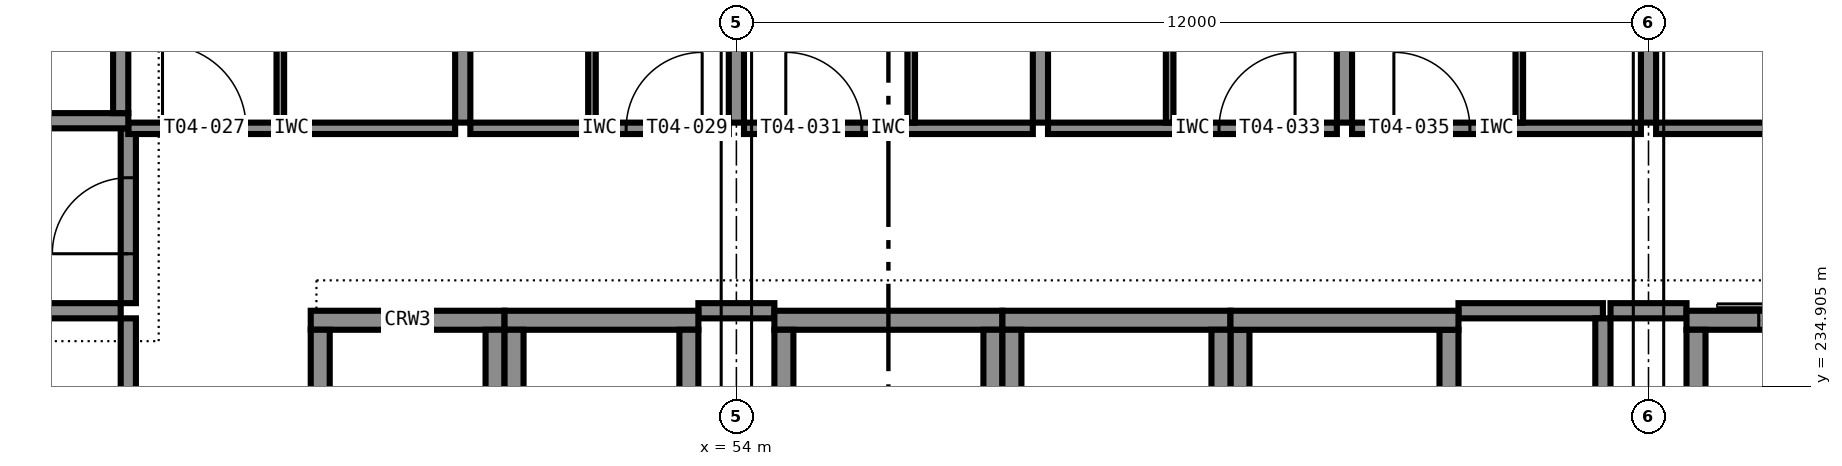
"""IFC4 building model, lengths in metres.
Left out: names, types, materials, properties, quantities, classifications, styles, units other than length and angle.
Written with IfcOpenShell. Run it as: python <this file> out.ifc"""

import sys

from ifc_helpers import new_model, si_unit, direction, frame, frame_2d, origin, place, context, subcontext, project, spatial, rectangle, extrude, element, fill, save


model = new_model("IFC4")
c1 = context("Model", 3, precision=1e-05, world=origin(), true_north=direction((0.0, 1.0)))
c2 = subcontext(c1, "Body", "Model", "MODEL_VIEW")
j1 = project(units=[si_unit("LENGTHUNIT", "METRE"), si_unit("PLANEANGLEUNIT", "RADIAN")], contexts=[c1])
p1 = place(None, origin())
s1 = spatial("IfcSite", under=j1, at=p1, CompositionType="ELEMENT")
p2 = place(p1, origin())
s2 = spatial("IfcBuilding", under=s1, at=p2, CompositionType="ELEMENT")
p3 = place(p2, frame((0.0, 0.0, 24.6)))
s3 = spatial("IfcBuildingStorey", under=s2, at=p3, CompositionType="ELEMENT", Elevation=24.6)
p4 = place(p3, frame((54.5, 235.775, 0.0), z_axis=(0.0, 0.0, 1.0), x_axis=(1.0, 0.0, 0.0)))
e1 = element("IfcWall", 1, at=p4, inside=s3, PredefinedType="SHEAR", context=c2, shape_type="SweptSolid", body=[
    extrude(rectangle(XDim=3.0, YDim=0.25, at=frame_2d((1.5, 0.0))), origin(), (0.0, 0.0, 1.0), 3.6),
])
for number, where, z_axis, x_axis in (
    (2, (54.625, 232.35, 0.0), (0.0, 0.0, 1.0), (0.0, 1.0, 0.0)),
    (3, (57.375, 232.35, 0.0), (0.0, 0.0, 1.0), (0.0, 1.0, 0.0)),
):
    element("IfcWall", number, at=place(p3, frame(where, z_axis=z_axis, x_axis=x_axis)), inside=s3, PredefinedType="SHEAR", context=c2, shape_type="SweptSolid", body=[
        extrude(rectangle(XDim=3.3, YDim=0.25, at=frame_2d((1.65, 0.0))), origin(), (0.0, 0.0, 1.0), 3.6),
    ])
p5 = place(p3, frame((57.5, 235.775, 0.0), z_axis=(0.0, 0.0, 1.0), x_axis=(1.0, 0.0, 0.0)))
e4 = element("IfcWall", 4, at=p5, inside=s3, PredefinedType="SHEAR", context=c2, shape_type="SweptSolid", body=[
    extrude(rectangle(XDim=3.0, YDim=0.25, at=frame_2d((1.5, 0.0))), origin(), (0.0, 0.0, 1.0), 3.6),
])
for number, where, z_axis, x_axis in (
    (5, (57.625, 232.35, 0.0), (0.0, 0.0, 1.0), (0.0, 1.0, 0.0)),
    (6, (60.375, 232.35, 0.0), (0.0, 0.0, 1.0), (0.0, 1.0, 0.0)),
):
    element("IfcWall", number, at=place(p3, frame(where, z_axis=z_axis, x_axis=x_axis)), inside=s3, PredefinedType="SHEAR", context=c2, shape_type="SweptSolid", body=[
        extrude(rectangle(XDim=3.3, YDim=0.25, at=frame_2d((1.65, 0.0))), origin(), (0.0, 0.0, 1.0), 3.6),
    ])
p6 = place(p3, frame((60.5, 235.775, 0.0), z_axis=(0.0, 0.0, 1.0), x_axis=(1.0, 0.0, 0.0)))
e7 = element("IfcWall", 7, at=p6, inside=s3, PredefinedType="SHEAR", context=c2, shape_type="SweptSolid", body=[
    extrude(rectangle(XDim=3.0, YDim=0.25, at=frame_2d((1.5, 0.0))), origin(), (0.0, 0.0, 1.0), 3.6),
])
for number, where, z_axis, x_axis in (
    (8, (60.625, 232.35, 0.0), (0.0, 0.0, 1.0), (0.0, 1.0, 0.0)),
    (9, (63.375, 232.35, 0.0), (0.0, 0.0, 1.0), (0.0, 1.0, 0.0)),
):
    element("IfcWall", number, at=place(p3, frame(where, z_axis=z_axis, x_axis=x_axis)), inside=s3, PredefinedType="SHEAR", context=c2, shape_type="SweptSolid", body=[
        extrude(rectangle(XDim=3.3, YDim=0.25, at=frame_2d((1.65, 0.0))), origin(), (0.0, 0.0, 1.0), 3.6),
    ])
p7 = place(p3, frame((66.5, 235.775, 0.0), z_axis=(0.0, 0.0, 1.0), x_axis=(1.0, 0.0, 0.0)))
e10 = element("IfcWall", 10, at=p7, inside=s3, PredefinedType="SHEAR", context=c2, shape_type="SweptSolid", body=[
    extrude(rectangle(XDim=3.0, YDim=0.25, at=frame_2d((1.5, 0.0))), origin(), (0.0, 0.0, 1.0), 3.6),
])
p8 = place(p7, frame((0.95, 0.0, 0.0)))
e11 = element("IfcOpeningElement", 11, at=p8, cuts=e10, PredefinedType="OPENING", context=c2, shape_type="SweptSolid", body=[
    extrude(rectangle(XDim=1.1, YDim=2.1, at=frame_2d((0.55, 1.05))), frame((0.0, 0.135, 0.0), z_axis=(0.0, -1.0, 0.0), x_axis=(1.0, 0.0, 0.0)), (0.0, 0.0, 1.0), 0.27),
])
p9 = place(p3, frame((66.625, 232.35, 0.0), z_axis=(0.0, 0.0, 1.0), x_axis=(0.0, 1.0, 0.0)))
e12 = element("IfcWall", 12, at=p9, inside=s3, PredefinedType="SHEAR", context=c2, shape_type="SweptSolid", body=[
    extrude(rectangle(XDim=3.3, YDim=0.25, at=frame_2d((1.65, 0.0))), origin(), (0.0, 0.0, 1.0), 3.6),
])
p10 = place(p3, frame((48.4, 235.775, 0.0), z_axis=(0.0, 0.0, 1.0), x_axis=(1.0, 0.0, 0.0)))
e13 = element("IfcWall", 13, at=p10, inside=s3, PredefinedType="SHEAR", context=c2, shape_type="SweptSolid", body=[
    extrude(rectangle(XDim=2.55, YDim=0.25, at=frame_2d((1.275, 0.0))), origin(), (0.0, 0.0, 1.0), 3.6),
])
for number, where, z_axis, x_axis in (
    (14, (48.525, 232.35, 0.0), (0.0, 0.0, 1.0), (0.0, 1.0, 0.0)),
    (15, (50.825, 232.35, 0.0), (0.0, 0.0, 1.0), (0.0, 1.0, 0.0)),
):
    element("IfcWall", number, at=place(p3, frame(where, z_axis=z_axis, x_axis=x_axis)), inside=s3, PredefinedType="SHEAR", context=c2, shape_type="SweptSolid", body=[
        extrude(rectangle(XDim=3.3, YDim=0.25, at=frame_2d((1.65, 0.0))), origin(), (0.0, 0.0, 1.0), 3.6),
    ])
p11 = place(p3, frame((50.95, 235.775, 0.0), z_axis=(0.0, 0.0, 1.0), x_axis=(1.0, 0.0, 0.0)))
e16 = element("IfcWall", 16, at=p11, inside=s3, PredefinedType="SHEAR", context=c2, shape_type="SweptSolid", body=[
    extrude(rectangle(XDim=2.55, YDim=0.25, at=frame_2d((1.275, 0.0))), origin(), (0.0, 0.0, 1.0), 3.6),
])
for number, where, z_axis, x_axis in (
    (17, (51.075, 232.35, 0.0), (0.0, 0.0, 1.0), (0.0, 1.0, 0.0)),
    (18, (53.375, 232.35, 0.0), (0.0, 0.0, 1.0), (0.0, 1.0, 0.0)),
):
    element("IfcWall", number, at=place(p3, frame(where, z_axis=z_axis, x_axis=x_axis)), inside=s3, PredefinedType="SHEAR", context=c2, shape_type="SweptSolid", body=[
        extrude(rectangle(XDim=3.3, YDim=0.25, at=frame_2d((1.65, 0.0))), origin(), (0.0, 0.0, 1.0), 3.6),
    ])
p12 = place(p3, frame((42.5, 238.4, 0.0), z_axis=(0.0, 0.0, 1.0), x_axis=(1.0, 0.0, 0.0)))
e19 = element("IfcWall", 19, at=p12, inside=s3, PredefinedType="SHEAR", context=c2, shape_type="SweptSolid", body=[
    extrude(rectangle(XDim=3.5, YDim=0.2, at=frame_2d((1.75, 0.0))), origin(), (0.0, 0.0, 1.0), 3.6),
])
p13 = place(p12, frame((1.15, 0.0, 0.0)))
e20 = element("IfcOpeningElement", 20, at=p13, cuts=e19, PredefinedType="OPENING", context=c2, shape_type="SweptSolid", body=[
    extrude(rectangle(XDim=1.2, YDim=2.1, at=frame_2d((0.6, 1.05))), frame((0.0, 0.11, 0.0), z_axis=(0.0, -1.0, 0.0), x_axis=(1.0, 0.0, 0.0)), (0.0, 0.0, 1.0), 0.22),
])
p14 = place(p3, frame((45.9, 238.5, 0.0), z_axis=(0.0, 0.0, 1.0), x_axis=(0.0, 1.0, 0.0)))
e21 = element("IfcWall", 21, at=p14, inside=s3, PredefinedType="SHEAR", context=c2, shape_type="SweptSolid", body=[
    extrude(rectangle(XDim=7.0, YDim=0.2, at=frame_2d((3.5, 0.0))), origin(), (0.0, 0.0, 1.0), 3.6),
])
p15 = place(p3, frame((42.3, 235.9, 0.0), z_axis=(0.0, 0.0, 1.0), x_axis=(1.0, 0.0, 0.0)))
e22 = element("IfcWall", 22, at=p15, inside=s3, PredefinedType="PARTITIONING", context=c2, shape_type="SweptSolid", body=[
    extrude(rectangle(XDim=3.6, YDim=0.2, at=frame_2d((1.8, 0.0))), origin(), (0.0, 0.0, 1.0), 3.4),
])
p16 = place(p3, frame((53.5, 235.9, 0.0), z_axis=(0.0, 0.0, 1.0), x_axis=(1.0, 0.0, 0.0)))
e23 = element("IfcWall", 23, at=p16, inside=s3, PredefinedType="PARTITIONING", context=c2, shape_type="SweptSolid", body=[
    extrude(rectangle(XDim=1.0, YDim=0.2, at=frame_2d((0.5, 0.0))), origin(), (0.0, 0.0, 1.0), 3.4),
])
p17 = place(p3, frame((63.5, 235.9, 0.0), z_axis=(0.0, 0.0, 1.0), x_axis=(1.0, 0.0, 0.0)))
e24 = element("IfcWall", 24, at=p17, inside=s3, PredefinedType="PARTITIONING", context=c2, shape_type="SweptSolid", body=[
    extrude(rectangle(XDim=1.9, YDim=0.2, at=frame_2d((0.95, 0.0))), origin(), (0.0, 0.0, 1.0), 3.4),
])
p18 = place(p3, frame((65.5, 235.9, 0.0), z_axis=(0.0, 0.0, 1.0), x_axis=(1.0, 0.0, 0.0)))
e25 = element("IfcWall", 25, at=p18, inside=s3, PredefinedType="PARTITIONING", context=c2, shape_type="SweptSolid", body=[
    extrude(rectangle(XDim=1.0, YDim=0.2, at=frame_2d((0.5, 0.0))), origin(), (0.0, 0.0, 1.0), 3.4),
])
p19 = place(p3, frame((46.0, 232.2, 0.0), z_axis=(0.0, 0.0, 1.0), x_axis=(0.0, 1.0, 0.0)))
e26 = element("IfcWall", 26, at=p19, inside=s3, PredefinedType="PARTITIONING", context=c2, shape_type="SweptSolid", body=[
    extrude(rectangle(XDim=3.6, YDim=0.2, at=frame_2d((1.8, 0.0))), origin(), (0.0, 0.0, 1.0), 3.4),
])
p20 = place(p19, frame((1.35, 0.0, 0.0)))
e27 = element("IfcOpeningElement", 27, at=p20, cuts=e26, PredefinedType="OPENING", context=c2, shape_type="SweptSolid", body=[
    extrude(rectangle(XDim=0.9, YDim=2.1, at=frame_2d((0.45, 1.05))), frame((0.0, 0.11, 0.0), z_axis=(0.0, -1.0, 0.0), x_axis=(1.0, 0.0, 0.0)), (0.0, 0.0, 1.0), 0.22),
])
p21 = place(p3, frame((46.0, 236.0, 0.0), z_axis=(0.0, 0.0, 1.0), x_axis=(0.0, 1.0, 0.0)))
e28 = element("IfcWall", 28, at=p21, inside=s3, PredefinedType="PARTITIONING", context=c2, shape_type="SweptSolid", body=[
    extrude(rectangle(XDim=2.3, YDim=0.2, at=frame_2d((1.15, 0.0))), origin(), (0.0, 0.0, 1.0), 3.4),
])
p22 = place(p21, frame((0.65, 0.0, 0.0)))
e29 = element("IfcOpeningElement", 29, at=p22, cuts=e28, PredefinedType="OPENING", context=c2, shape_type="SweptSolid", body=[
    extrude(rectangle(XDim=1.0, YDim=2.1, at=frame_2d((0.5, 1.05))), frame((0.0, 0.11, 0.0), z_axis=(0.0, -1.0, 0.0), x_axis=(1.0, 0.0, 0.0)), (0.0, 0.0, 1.0), 0.22),
])
p23 = place(p3, frame((65.4, 232.2, 0.0), z_axis=(0.0, 0.0, 1.0), x_axis=(0.0, 1.0, 0.0)))
e30 = element("IfcWall", 30, at=p23, inside=s3, PredefinedType="PARTITIONING", context=c2, shape_type="SweptSolid", body=[
    extrude(rectangle(XDim=3.6, YDim=0.2, at=frame_2d((1.8, 0.0))), origin(), (0.0, 0.0, 1.0), 3.4),
])
p24 = place(p3, frame((46.0, 238.3, 0.0), z_axis=(0.0, 0.0, 1.0), x_axis=(1.0, 0.0, 0.0)))
e31 = element("IfcWall", 31, at=p24, inside=s3, PredefinedType="PARTITIONING", context=c2, shape_type="SweptSolid", body=[
    extrude(rectangle(XDim=4.3, YDim=0.15, at=frame_2d((2.15, 0.0))), origin(), (0.0, 0.0, 1.0), 3.4),
])
p25 = place(p24, frame((0.45, 0.0, 0.0)))
e32 = element("IfcOpeningElement", 32, at=p25, cuts=e31, PredefinedType="OPENING", context=c2, shape_type="SweptSolid", body=[
    extrude(rectangle(XDim=1.1, YDim=2.1, at=frame_2d((0.55, 1.05))), frame((0.0, 0.085, 0.0), z_axis=(0.0, -1.0, 0.0), x_axis=(1.0, 0.0, 0.0)), (0.0, 0.0, 1.0), 0.17),
])
p26 = place(p3, frame((48.0, 238.375, 0.0), z_axis=(0.0, 0.0, 1.0), x_axis=(0.0, 1.0, 0.0)))
e33 = element("IfcWall", 33, at=p26, inside=s3, PredefinedType="PARTITIONING", context=c2, shape_type="SweptSolid", body=[
    extrude(rectangle(XDim=2.875, YDim=0.1, at=frame_2d((1.438, 0.0))), origin(), (0.0, 0.0, 1.0), 3.4),
])
p27 = place(p26, frame((0.988, 0.0, 0.0)))
e34 = element("IfcOpeningElement", 34, at=p27, cuts=e33, PredefinedType="OPENING", context=c2, shape_type="SweptSolid", body=[
    extrude(rectangle(XDim=0.9, YDim=2.1, at=frame_2d((0.45, 1.05))), frame((0.0, 0.06, 0.0), z_axis=(0.0, -1.0, 0.0), x_axis=(1.0, 0.0, 0.0)), (0.0, 0.0, 1.0), 0.12),
])
p28 = place(p3, frame((50.5, 238.3, 0.0), z_axis=(0.0, 0.0, 1.0), x_axis=(1.0, 0.0, 0.0)))
e35 = element("IfcWall", 35, at=p28, inside=s3, PredefinedType="PARTITIONING", context=c2, shape_type="SweptSolid", body=[
    extrude(rectangle(XDim=3.4, YDim=0.15, at=frame_2d((1.7, 0.0))), origin(), (0.0, 0.0, 1.0), 3.4),
])
p29 = place(p28, frame((2.05, 0.0, 0.0)))
e36 = element("IfcOpeningElement", 36, at=p29, cuts=e35, PredefinedType="OPENING", context=c2, shape_type="SweptSolid", body=[
    extrude(rectangle(XDim=1.0, YDim=2.1, at=frame_2d((0.5, 1.05))), frame((0.0, 0.085, 0.0), z_axis=(0.0, -1.0, 0.0), x_axis=(1.0, 0.0, 0.0)), (0.0, 0.0, 1.0), 0.17),
])
p30 = place(p3, frame((52.1, 241.25, 0.0), z_axis=(0.0, 0.0, 1.0), x_axis=(0.0, -1.0, 0.0)))
e37 = element("IfcWall", 37, at=p30, inside=s3, PredefinedType="PARTITIONING", context=c2, shape_type="SweptSolid", body=[
    extrude(rectangle(XDim=2.875, YDim=0.1, at=frame_2d((1.438, 0.0))), origin(), (0.0, 0.0, 1.0), 3.4),
])
p31 = place(p30, frame((1.038, 0.0, 0.0)))
e38 = element("IfcOpeningElement", 38, at=p31, cuts=e37, PredefinedType="OPENING", context=c2, shape_type="SweptSolid", body=[
    extrude(rectangle(XDim=0.8, YDim=2.1, at=frame_2d((0.4, 1.05))), frame((0.0, 0.06, 0.0), z_axis=(0.0, -1.0, 0.0), x_axis=(1.0, 0.0, 0.0)), (0.0, 0.0, 1.0), 0.12),
])
p32 = place(p3, frame((54.1, 238.3, 0.0), z_axis=(0.0, 0.0, 1.0), x_axis=(1.0, 0.0, 0.0)))
e39 = element("IfcWall", 39, at=p32, inside=s3, PredefinedType="PARTITIONING", context=c2, shape_type="SweptSolid", body=[
    extrude(rectangle(XDim=3.8, YDim=0.15, at=frame_2d((1.9, 0.0))), origin(), (0.0, 0.0, 1.0), 3.4),
])
p33 = place(p32, frame((0.55, 0.0, 0.0)))
e40 = element("IfcOpeningElement", 40, at=p33, cuts=e39, PredefinedType="OPENING", context=c2, shape_type="SweptSolid", body=[
    extrude(rectangle(XDim=1.0, YDim=2.1, at=frame_2d((0.5, 1.05))), frame((0.0, 0.085, 0.0), z_axis=(0.0, -1.0, 0.0), x_axis=(1.0, 0.0, 0.0)), (0.0, 0.0, 1.0), 0.17),
])
p34 = place(p3, frame((56.3, 238.375, 0.0), z_axis=(0.0, 0.0, 1.0), x_axis=(0.0, 1.0, 0.0)))
e41 = element("IfcWall", 41, at=p34, inside=s3, PredefinedType="PARTITIONING", context=c2, shape_type="SweptSolid", body=[
    extrude(rectangle(XDim=2.875, YDim=0.1, at=frame_2d((1.438, 0.0))), origin(), (0.0, 0.0, 1.0), 3.4),
])
p35 = place(p34, frame((1.038, 0.0, 0.0)))
e42 = element("IfcOpeningElement", 42, at=p35, cuts=e41, PredefinedType="OPENING", context=c2, shape_type="SweptSolid", body=[
    extrude(rectangle(XDim=0.8, YDim=2.1, at=frame_2d((0.4, 1.05))), frame((0.0, 0.06, 0.0), z_axis=(0.0, -1.0, 0.0), x_axis=(1.0, 0.0, 0.0)), (0.0, 0.0, 1.0), 0.12),
])
p36 = place(p3, frame((58.1, 238.3, 0.0), z_axis=(0.0, 0.0, 1.0), x_axis=(1.0, 0.0, 0.0)))
e43 = element("IfcWall", 43, at=p36, inside=s3, PredefinedType="PARTITIONING", context=c2, shape_type="SweptSolid", body=[
    extrude(rectangle(XDim=3.8, YDim=0.15, at=frame_2d((1.9, 0.0))), origin(), (0.0, 0.0, 1.0), 3.4),
])
p37 = place(p36, frame((2.25, 0.0, 0.0)))
e44 = element("IfcOpeningElement", 44, at=p37, cuts=e43, PredefinedType="OPENING", context=c2, shape_type="SweptSolid", body=[
    extrude(rectangle(XDim=1.0, YDim=2.1, at=frame_2d((0.5, 1.05))), frame((0.0, 0.085, 0.0), z_axis=(0.0, -1.0, 0.0), x_axis=(1.0, 0.0, 0.0)), (0.0, 0.0, 1.0), 0.17),
])
p38 = place(p3, frame((59.7, 241.25, 0.0), z_axis=(0.0, 0.0, 1.0), x_axis=(0.0, -1.0, 0.0)))
e45 = element("IfcWall", 45, at=p38, inside=s3, PredefinedType="PARTITIONING", context=c2, shape_type="SweptSolid", body=[
    extrude(rectangle(XDim=2.875, YDim=0.1, at=frame_2d((1.438, 0.0))), origin(), (0.0, 0.0, 1.0), 3.4),
])
p39 = place(p38, frame((1.038, 0.0, 0.0)))
e46 = element("IfcOpeningElement", 46, at=p39, cuts=e45, PredefinedType="OPENING", context=c2, shape_type="SweptSolid", body=[
    extrude(rectangle(XDim=0.8, YDim=2.1, at=frame_2d((0.4, 1.05))), frame((0.0, 0.06, 0.0), z_axis=(0.0, -1.0, 0.0), x_axis=(1.0, 0.0, 0.0)), (0.0, 0.0, 1.0), 0.12),
])
p40 = place(p3, frame((62.1, 238.3, 0.0), z_axis=(0.0, 0.0, 1.0), x_axis=(1.0, 0.0, 0.0)))
e47 = element("IfcWall", 47, at=p40, inside=s3, PredefinedType="PARTITIONING", context=c2, shape_type="SweptSolid", body=[
    extrude(rectangle(XDim=3.8, YDim=0.15, at=frame_2d((1.9, 0.0))), origin(), (0.0, 0.0, 1.0), 3.4),
])
p41 = place(p40, frame((0.55, 0.0, 0.0)))
e48 = element("IfcOpeningElement", 48, at=p41, cuts=e47, PredefinedType="OPENING", context=c2, shape_type="SweptSolid", body=[
    extrude(rectangle(XDim=1.0, YDim=2.1, at=frame_2d((0.5, 1.05))), frame((0.0, 0.085, 0.0), z_axis=(0.0, -1.0, 0.0), x_axis=(1.0, 0.0, 0.0)), (0.0, 0.0, 1.0), 0.17),
])
p42 = place(p3, frame((64.3, 238.375, 0.0), z_axis=(0.0, 0.0, 1.0), x_axis=(0.0, 1.0, 0.0)))
e49 = element("IfcWall", 49, at=p42, inside=s3, PredefinedType="PARTITIONING", context=c2, shape_type="SweptSolid", body=[
    extrude(rectangle(XDim=2.875, YDim=0.1, at=frame_2d((1.438, 0.0))), origin(), (0.0, 0.0, 1.0), 3.4),
])
p43 = place(p42, frame((1.038, 0.0, 0.0)))
e50 = element("IfcOpeningElement", 50, at=p43, cuts=e49, PredefinedType="OPENING", context=c2, shape_type="SweptSolid", body=[
    extrude(rectangle(XDim=0.8, YDim=2.1, at=frame_2d((0.4, 1.05))), frame((0.0, 0.06, 0.0), z_axis=(0.0, -1.0, 0.0), x_axis=(1.0, 0.0, 0.0)), (0.0, 0.0, 1.0), 0.12),
])
p44 = place(p3, frame((66.1, 238.3, 0.0), z_axis=(0.0, 0.0, 1.0), x_axis=(1.0, 0.0, 0.0)))
e51 = element("IfcWall", 51, at=p44, inside=s3, PredefinedType="PARTITIONING", context=c2, shape_type="SweptSolid", body=[
    extrude(rectangle(XDim=3.8, YDim=0.15, at=frame_2d((1.9, 0.0))), origin(), (0.0, 0.0, 1.0), 3.4),
])
p45 = place(p44, frame((2.25, 0.0, 0.0)))
e52 = element("IfcOpeningElement", 52, at=p45, cuts=e51, PredefinedType="OPENING", context=c2, shape_type="SweptSolid", body=[
    extrude(rectangle(XDim=1.0, YDim=2.1, at=frame_2d((0.5, 1.05))), frame((0.0, 0.085, 0.0), z_axis=(0.0, -1.0, 0.0), x_axis=(1.0, 0.0, 0.0)), (0.0, 0.0, 1.0), 0.17),
])
p46 = place(p3, frame((50.4, 245.7, 0.0), z_axis=(0.0, 0.0, 1.0), x_axis=(0.0, -1.0, 0.0)))
e53 = element("IfcWall", 53, at=p46, inside=s3, PredefinedType="PARTITIONING", context=c2, shape_type="SweptSolid", body=[
    extrude(rectangle(XDim=7.325, YDim=0.2, at=frame_2d((3.663, 0.0))), origin(), (0.0, 0.0, 1.0), 3.4),
])
p47 = place(p3, frame((54.0, 245.55, 0.0), z_axis=(0.0, 0.0, 1.0), x_axis=(0.0, -1.0, 0.0)))
e54 = element("IfcWall", 54, at=p47, inside=s3, PredefinedType="PARTITIONING", context=c2, shape_type="SweptSolid", body=[
    extrude(rectangle(XDim=7.175, YDim=0.2, at=frame_2d((3.587, 0.0))), origin(), (0.0, 0.0, 1.0), 2.6),
])
for number, where, z_axis, x_axis in (
    (55, (58.0, 245.7, 0.0), (0.0, 0.0, 1.0), (0.0, -1.0, 0.0)),
    (56, (62.0, 245.7, 0.0), (0.0, 0.0, 1.0), (0.0, -1.0, 0.0)),
):
    element("IfcWall", number, at=place(p3, frame(where, z_axis=z_axis, x_axis=x_axis)), inside=s3, PredefinedType="PARTITIONING", context=c2, shape_type="SweptSolid", body=[
        extrude(rectangle(XDim=7.325, YDim=0.2, at=frame_2d((3.663, 0.0))), origin(), (0.0, 0.0, 1.0), 3.4),
    ])
p48 = place(p3, frame((66.0, 245.55, 0.0), z_axis=(0.0, 0.0, 1.0), x_axis=(0.0, -1.0, 0.0)))
e57 = element("IfcWall", 57, at=p48, inside=s3, PredefinedType="PARTITIONING", context=c2, shape_type="SweptSolid", body=[
    extrude(rectangle(XDim=7.175, YDim=0.2, at=frame_2d((3.587, 0.0))), origin(), (0.0, 0.0, 1.0), 2.6),
])
p49 = place(p22, origin())
e58 = element("IfcDoor", 58, at=p49, inside=s3, OperationType="SINGLE_SWING_LEFT", PredefinedType="DOOR", context=c2, shape_type="SweptSolid", body=[
    extrude(rectangle(XDim=1.0, YDim=2.1, at=frame_2d((0.5, 1.05))), frame((0.0, 0.025, 0.0), z_axis=(0.0, -1.0, 0.0), x_axis=(1.0, 0.0, 0.0)), (0.0, 0.0, 1.0), 0.05),
])
fill(e29, e58)
p50 = place(p25, origin())
e59 = element("IfcDoor", 59, at=p50, inside=s3, OperationType="SINGLE_SWING_LEFT", PredefinedType="DOOR", context=c2, shape_type="SweptSolid", body=[
    extrude(rectangle(XDim=1.1, YDim=2.1, at=frame_2d((0.55, 1.05))), frame((0.0, 0.025, 0.0), z_axis=(0.0, -1.0, 0.0), x_axis=(1.0, 0.0, 0.0)), (0.0, 0.0, 1.0), 0.05),
])
fill(e32, e59)
p51 = place(p29, origin())
e60 = element("IfcDoor", 60, at=p51, inside=s3, OperationType="SINGLE_SWING_RIGHT", PredefinedType="DOOR", context=c2, shape_type="SweptSolid", body=[
    extrude(rectangle(XDim=1.0, YDim=2.1, at=frame_2d((0.5, 1.05))), frame((0.0, 0.025, 0.0), z_axis=(0.0, -1.0, 0.0), x_axis=(1.0, 0.0, 0.0)), (0.0, 0.0, 1.0), 0.05),
])
fill(e36, e60)
p52 = place(p33, origin())
e61 = element("IfcDoor", 61, at=p52, inside=s3, OperationType="SINGLE_SWING_LEFT", PredefinedType="DOOR", context=c2, shape_type="SweptSolid", body=[
    extrude(rectangle(XDim=1.0, YDim=2.1, at=frame_2d((0.5, 1.05))), frame((0.0, 0.025, 0.0), z_axis=(0.0, -1.0, 0.0), x_axis=(1.0, 0.0, 0.0)), (0.0, 0.0, 1.0), 0.05),
])
fill(e40, e61)
p53 = place(p37, origin())
e62 = element("IfcDoor", 62, at=p53, inside=s3, OperationType="SINGLE_SWING_RIGHT", PredefinedType="DOOR", context=c2, shape_type="SweptSolid", body=[
    extrude(rectangle(XDim=1.0, YDim=2.1, at=frame_2d((0.5, 1.05))), frame((0.0, 0.025, 0.0), z_axis=(0.0, -1.0, 0.0), x_axis=(1.0, 0.0, 0.0)), (0.0, 0.0, 1.0), 0.05),
])
fill(e44, e62)
p54 = place(p41, origin())
e63 = element("IfcDoor", 63, at=p54, inside=s3, OperationType="SINGLE_SWING_LEFT", PredefinedType="DOOR", context=c2, shape_type="SweptSolid", body=[
    extrude(rectangle(XDim=1.0, YDim=2.1, at=frame_2d((0.5, 1.05))), frame((0.0, 0.025, 0.0), z_axis=(0.0, -1.0, 0.0), x_axis=(1.0, 0.0, 0.0)), (0.0, 0.0, 1.0), 0.05),
])
fill(e48, e63)
p55 = place(p8, origin())
e64 = element("IfcDoor", 64, at=p55, inside=s3, OperationType="SLIDING_TO_LEFT", PredefinedType="DOOR", context=c2, shape_type="SweptSolid", body=[
    extrude(rectangle(XDim=1.1, YDim=2.1, at=frame_2d((0.55, 1.05))), frame((0.0, 0.025, 0.0), z_axis=(0.0, -1.0, 0.0), x_axis=(1.0, 0.0, 0.0)), (0.0, 0.0, 1.0), 0.05),
])
fill(e11, e64)
save(model, sys.argv[1])
